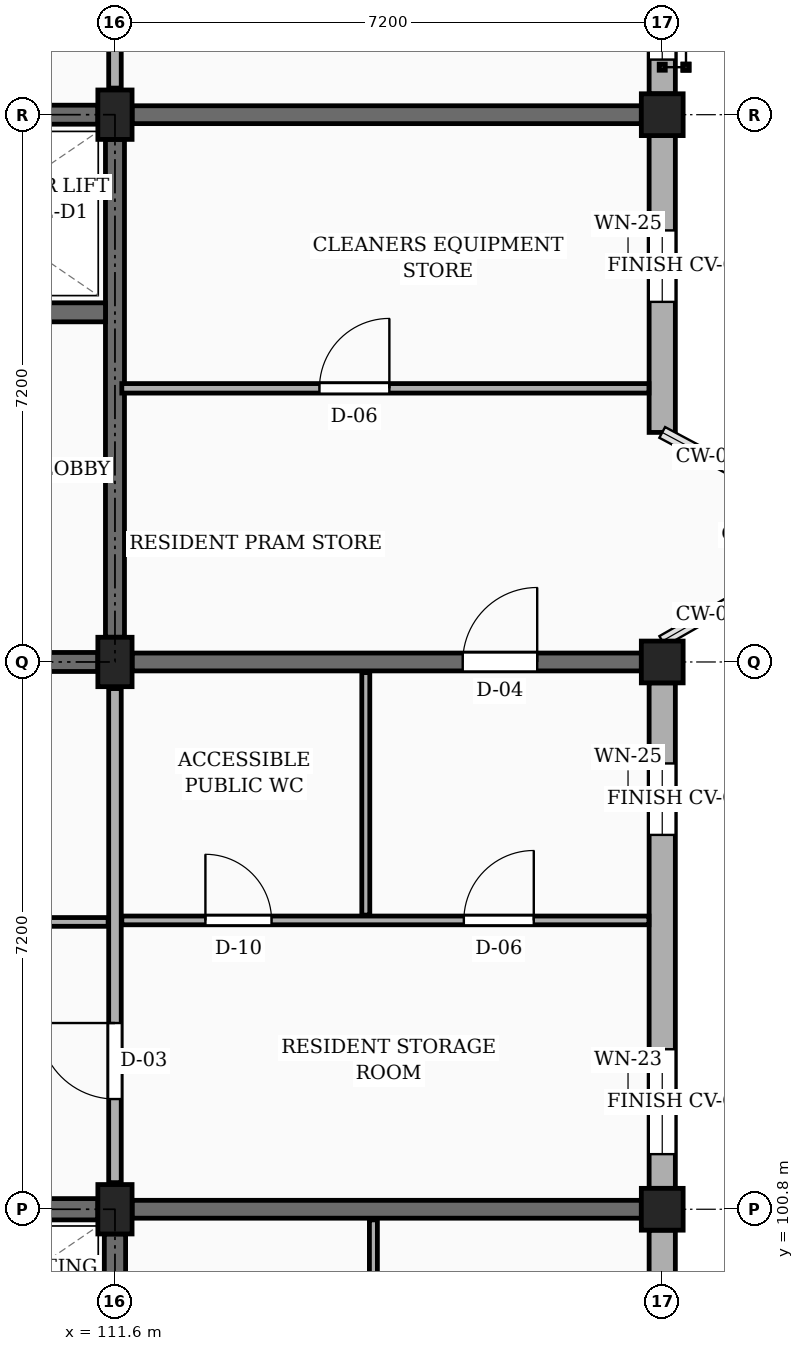
"""IFC4 building model, lengths in metres.
Left out: names, types, materials, properties, quantities, classifications, styles, units other than length and angle.
Written with IfcOpenShell. Run it as: python <this file> out.ifc"""

import sys

from ifc_helpers import new_model, si_unit, direction, frame, frame_2d, origin, origin_2d, place, context, subcontext, project, spatial, rectangle, extrude, element, fill, save


model = new_model("IFC4")
c1 = context("Model", 3, precision=1e-05, world=origin(), true_north=direction((0.0, 1.0)))
c2 = subcontext(c1, "Body", "Model", "MODEL_VIEW")
j1 = project(units=[si_unit("LENGTHUNIT", "METRE"), si_unit("PLANEANGLEUNIT", "RADIAN")], contexts=[c1])
p1 = place(None, origin())
s1 = spatial("IfcSite", under=j1, at=p1, CompositionType="ELEMENT")
p2 = place(p1, origin())
s2 = spatial("IfcBuilding", under=s1, at=p2, CompositionType="ELEMENT")
p3 = place(p2, frame((0.0, 0.0, 13.95)))
s3 = spatial("IfcBuildingStorey", under=s2, at=p3, CompositionType="ELEMENT", Elevation=13.95)
for number, where, z_axis, x_axis in (
    (1, (111.6, 100.8, 0.0), (0.0, 0.0, 1.0), (1.0, 0.0, 0.0)),
    (2, (111.6, 108.0, 0.0), (0.0, 0.0, 1.0), (1.0, 0.0, 0.0)),
    (3, (111.6, 115.2, 0.0), (0.0, 0.0, 1.0), (1.0, 0.0, 0.0)),
):
    element("IfcColumn", number, at=place(p3, frame(where, z_axis=z_axis, x_axis=x_axis)), inside=s3, PredefinedType="COLUMN", context=c2, shape_type="SweptSolid", body=[
        extrude(rectangle(XDim=0.45, YDim=0.65, at=origin_2d()), origin(), (0.0, 0.0, 1.0), 3.15),
    ])
for number, where, z_axis, x_axis in (
    (4, (118.8, 100.8, 0.0), (0.0, 0.0, 1.0), (1.0, 0.0, 0.0)),
    (5, (118.8, 108.0, 0.0), (0.0, 0.0, 1.0), (1.0, 0.0, 0.0)),
    (6, (118.8, 115.2, 0.0), (0.0, 0.0, 1.0), (1.0, 0.0, 0.0)),
):
    element("IfcColumn", number, at=place(p3, frame(where, z_axis=z_axis, x_axis=x_axis)), inside=s3, PredefinedType="COLUMN", context=c2, shape_type="SweptSolid", body=[
        extrude(rectangle(XDim=0.55, YDim=0.55, at=origin_2d()), origin(), (0.0, 0.0, 1.0), 3.15),
    ])
p4 = place(p3, frame((111.825, 100.8, 0.0), z_axis=(0.0, 0.0, 1.0), x_axis=(1.0, 0.0, 0.0)))
e7 = element("IfcWall", 7, at=p4, inside=s3, PredefinedType="SOLIDWALL", context=c2, shape_type="SweptSolid", body=[
    extrude(rectangle(XDim=6.7, YDim=0.235, at=frame_2d((3.35, 0.0))), origin(), (0.0, 0.0, 1.0), 2.19),
])
p5 = place(p3, frame((111.825, 108.0, 0.0), z_axis=(0.0, 0.0, 1.0), x_axis=(1.0, 0.0, 0.0)))
e8 = element("IfcWall", 8, at=p5, inside=s3, PredefinedType="SOLIDWALL", context=c2, shape_type="SweptSolid", body=[
    extrude(rectangle(XDim=6.7, YDim=0.235, at=frame_2d((3.35, 0.0))), origin(), (0.0, 0.0, 1.0), 2.19),
])
p6 = place(p5, frame((4.35, 0.0, 0.0)))
e9 = element("IfcOpeningElement", 9, at=p6, cuts=e8, PredefinedType="OPENING", context=c2, shape_type="SweptSolid", body=[
    extrude(rectangle(XDim=0.98, YDim=2.12, at=frame_2d((0.49, 1.06))), frame((0.0, 0.127, 0.0), z_axis=(0.0, -1.0, 0.0), x_axis=(1.0, 0.0, 0.0)), (0.0, 0.0, 1.0), 0.255),
])
p7 = place(p3, frame((111.825, 115.2, 0.0), z_axis=(0.0, 0.0, 1.0), x_axis=(1.0, 0.0, 0.0)))
e10 = element("IfcWall", 10, at=p7, inside=s3, PredefinedType="SOLIDWALL", context=c2, shape_type="SweptSolid", body=[
    extrude(rectangle(XDim=6.7, YDim=0.235, at=frame_2d((3.35, 0.0))), origin(), (0.0, 0.0, 1.0), 2.19),
])
p8 = place(p3, frame((118.8, 93.875, 0.0), z_axis=(0.0, 0.0, 1.0), x_axis=(0.0, 1.0, 0.0)))
e11 = element("IfcWall", 11, at=p8, inside=s3, PredefinedType="SOLIDWALL", context=c2, shape_type="SweptSolid", body=[
    extrude(rectangle(XDim=6.65, YDim=0.345, at=frame_2d((3.325, 0.0))), origin(), (0.0, 0.0, 1.0), 2.46),
])
p9 = place(p8, frame((0.45, 0.0, 0.78)))
e12 = element("IfcOpeningElement", 12, at=p9, cuts=e11, PredefinedType="OPENING", context=c2, shape_type="SweptSolid", body=[
    extrude(rectangle(XDim=1.22, YDim=1.36, at=frame_2d((0.61, 0.68))), frame((0.0, 0.183, 0.0), z_axis=(0.0, -1.0, 0.0), x_axis=(1.0, 0.0, 0.0)), (0.0, 0.0, 1.0), 0.365),
])
p10 = place(p8, frame((4.65, 0.0, 0.78)))
e13 = element("IfcOpeningElement", 13, at=p10, cuts=e11, PredefinedType="OPENING", context=c2, shape_type="SweptSolid", body=[
    extrude(rectangle(XDim=1.38, YDim=1.36, at=frame_2d((0.69, 0.68))), frame((0.0, 0.183, 0.0), z_axis=(0.0, -1.0, 0.0), x_axis=(1.0, 0.0, 0.0)), (0.0, 0.0, 1.0), 0.365),
])
p11 = place(p3, frame((118.8, 101.075, 0.0), z_axis=(0.0, 0.0, 1.0), x_axis=(0.0, 1.0, 0.0)))
e14 = element("IfcWall", 14, at=p11, inside=s3, PredefinedType="SOLIDWALL", context=c2, shape_type="SweptSolid", body=[
    extrude(rectangle(XDim=6.65, YDim=0.345, at=frame_2d((3.325, 0.0))), origin(), (0.0, 0.0, 1.0), 2.46),
])
p12 = place(p11, frame((0.45, 0.0, 0.78)))
e15 = element("IfcOpeningElement", 15, at=p12, cuts=e14, PredefinedType="OPENING", context=c2, shape_type="SweptSolid", body=[
    extrude(rectangle(XDim=1.38, YDim=1.36, at=frame_2d((0.69, 0.68))), frame((0.0, 0.183, 0.0), z_axis=(0.0, -1.0, 0.0), x_axis=(1.0, 0.0, 0.0)), (0.0, 0.0, 1.0), 0.365),
])
p13 = place(p11, frame((4.65, 0.0, 0.78)))
e16 = element("IfcOpeningElement", 16, at=p13, cuts=e14, PredefinedType="OPENING", context=c2, shape_type="SweptSolid", body=[
    extrude(rectangle(XDim=0.94, YDim=1.44, at=frame_2d((0.47, 0.72))), frame((0.0, 0.183, 0.0), z_axis=(0.0, -1.0, 0.0), x_axis=(1.0, 0.0, 0.0)), (0.0, 0.0, 1.0), 0.365),
])
p14 = place(p3, frame((118.8, 111.02, 0.0), z_axis=(0.0, 0.0, 1.0), x_axis=(0.0, 1.0, 0.0)))
e17 = element("IfcWall", 17, at=p14, inside=s3, PredefinedType="SOLIDWALL", context=c2, shape_type="SweptSolid", body=[
    extrude(rectangle(XDim=3.905, YDim=0.345, at=frame_2d((1.953, 0.0))), origin(), (0.0, 0.0, 1.0), 2.46),
])
p15 = place(p14, frame((1.718, 0.0, 0.78)))
e18 = element("IfcOpeningElement", 18, at=p15, cuts=e17, PredefinedType="OPENING", context=c2, shape_type="SweptSolid", body=[
    extrude(rectangle(XDim=0.94, YDim=1.44, at=frame_2d((0.47, 0.72))), frame((0.0, 0.183, 0.0), z_axis=(0.0, -1.0, 0.0), x_axis=(1.0, 0.0, 0.0)), (0.0, 0.0, 1.0), 0.365),
])
p16 = place(p3, frame((118.8, 115.475, 0.0), z_axis=(0.0, 0.0, 1.0), x_axis=(0.0, 1.0, 0.0)))
e19 = element("IfcWall", 19, at=p16, inside=s3, PredefinedType="SOLIDWALL", context=c2, shape_type="SweptSolid", body=[
    extrude(rectangle(XDim=6.65, YDim=0.345, at=frame_2d((3.325, 0.0))), origin(), (0.0, 0.0, 1.0), 2.46),
])
p17 = place(p16, frame((0.45, 0.0, 0.78)))
e20 = element("IfcOpeningElement", 20, at=p17, cuts=e19, PredefinedType="OPENING", context=c2, shape_type="SweptSolid", body=[
    extrude(rectangle(XDim=1.05, YDim=1.44, at=frame_2d((0.525, 0.72))), frame((0.0, 0.183, 0.0), z_axis=(0.0, -1.0, 0.0), x_axis=(1.0, 0.0, 0.0)), (0.0, 0.0, 1.0), 0.365),
])
p18 = place(p16, frame((4.65, 0.0, 0.78)))
e21 = element("IfcOpeningElement", 21, at=p18, cuts=e19, PredefinedType="OPENING", context=c2, shape_type="SweptSolid", body=[
    extrude(rectangle(XDim=1.25, YDim=1.44, at=frame_2d((0.625, 0.72))), frame((0.0, 0.183, 0.0), z_axis=(0.0, -1.0, 0.0), x_axis=(1.0, 0.0, 0.0)), (0.0, 0.0, 1.0), 0.365),
])
p19 = place(p3, frame((104.625, 100.8, 0.0), z_axis=(0.0, 0.0, 1.0), x_axis=(1.0, 0.0, 0.0)))
e22 = element("IfcWall", 22, at=p19, inside=s3, PredefinedType="SHEAR", context=c2, shape_type="SweptSolid", body=[
    extrude(rectangle(XDim=6.75, YDim=0.28, at=frame_2d((3.375, 0.0))), origin(), (0.0, 0.0, 1.0), 2.89),
])
p20 = place(p3, frame((111.6, 93.925, 0.0), z_axis=(0.0, 0.0, 1.0), x_axis=(0.0, 1.0, 0.0)))
e23 = element("IfcWall", 23, at=p20, inside=s3, PredefinedType="SHEAR", context=c2, shape_type="SweptSolid", body=[
    extrude(rectangle(XDim=6.55, YDim=0.28, at=frame_2d((3.275, 0.0))), origin(), (0.0, 0.0, 1.0), 2.89),
])
p21 = place(p3, frame((104.625, 115.2, 0.0), z_axis=(0.0, 0.0, 1.0), x_axis=(1.0, 0.0, 0.0)))
e24 = element("IfcWall", 24, at=p21, inside=s3, PredefinedType="SHEAR", context=c2, shape_type="SweptSolid", body=[
    extrude(rectangle(XDim=6.75, YDim=0.25, at=frame_2d((3.375, 0.0))), origin(), (0.0, 0.0, 1.0), 2.89),
])
p22 = place(p3, frame((111.6, 108.325, 0.0), z_axis=(0.0, 0.0, 1.0), x_axis=(0.0, 1.0, 0.0)))
e25 = element("IfcWall", 25, at=p22, inside=s3, PredefinedType="SHEAR", context=c2, shape_type="SweptSolid", body=[
    extrude(rectangle(XDim=6.55, YDim=0.25, at=frame_2d((3.275, 0.0))), origin(), (0.0, 0.0, 1.0), 2.89),
])
p23 = place(p3, frame((104.625, 108.0, 0.0), z_axis=(0.0, 0.0, 1.0), x_axis=(1.0, 0.0, 0.0)))
e26 = element("IfcWall", 26, at=p23, inside=s3, PredefinedType="SHEAR", context=c2, shape_type="SweptSolid", body=[
    extrude(rectangle(XDim=6.75, YDim=0.25, at=frame_2d((3.375, 0.0))), origin(), (0.0, 0.0, 1.0), 2.89),
])
p24 = place(p23, frame((4.525, 0.0, 0.0)))
e27 = element("IfcOpeningElement", 27, at=p24, cuts=e26, PredefinedType="OPENING", context=c2, shape_type="SweptSolid", body=[
    extrude(rectangle(XDim=1.1, YDim=2.15, at=frame_2d((0.55, 1.075))), frame((0.0, 0.135, 0.0), z_axis=(0.0, -1.0, 0.0), x_axis=(1.0, 0.0, 0.0)), (0.0, 0.0, 1.0), 0.27),
])
p25 = place(p3, frame((108.125, 112.6, 0.0), z_axis=(0.0, 0.0, 1.0), x_axis=(1.0, 0.0, 0.0)))
e28 = element("IfcWall", 28, at=p25, inside=s3, PredefinedType="SHEAR", context=c2, shape_type="SweptSolid", body=[
    extrude(rectangle(XDim=3.35, YDim=0.25, at=frame_2d((1.675, 0.0))), origin(), (0.0, 0.0, 1.0), 2.89),
])
p26 = place(p25, frame((1.1, 0.0, 0.0)))
e29 = element("IfcOpeningElement", 29, at=p26, cuts=e28, PredefinedType="OPENING", context=c2, shape_type="SweptSolid", body=[
    extrude(rectangle(XDim=1.0, YDim=2.2, at=frame_2d((0.5, 1.1))), frame((0.0, 0.135, 0.0), z_axis=(0.0, -1.0, 0.0), x_axis=(1.0, 0.0, 0.0)), (0.0, 0.0, 1.0), 0.27),
])
p27 = place(p3, frame((111.6, 101.15, 0.0), z_axis=(0.0, 0.0, 1.0), x_axis=(0.0, 1.0, 0.0)))
e30 = element("IfcWall", 30, at=p27, inside=s3, PredefinedType="PARTITIONING", context=c2, shape_type="SweptSolid", body=[
    extrude(rectangle(XDim=6.5, YDim=0.165, at=frame_2d((3.25, 0.0))), origin(), (0.0, 0.0, 1.0), 2.325),
])
p28 = place(p27, frame((1.1, 0.0, 0.0)))
e31 = element("IfcOpeningElement", 31, at=p28, cuts=e30, PredefinedType="OPENING", context=c2, shape_type="SweptSolid", body=[
    extrude(rectangle(XDim=1.0, YDim=2.15, at=frame_2d((0.5, 1.075))), frame((0.0, 0.093, 0.0), z_axis=(0.0, -1.0, 0.0), x_axis=(1.0, 0.0, 0.0)), (0.0, 0.0, 1.0), 0.185),
])
p29 = place(p3, frame((111.6, 115.55, 0.0), z_axis=(0.0, 0.0, 1.0), x_axis=(0.0, 1.0, 0.0)))
e32 = element("IfcWall", 32, at=p29, inside=s3, PredefinedType="PARTITIONING", context=c2, shape_type="SweptSolid", body=[
    extrude(rectangle(XDim=6.5, YDim=0.165, at=frame_2d((3.25, 0.0))), origin(), (0.0, 0.0, 1.0), 2.325),
])
p30 = place(p29, frame((1.1, 0.0, 0.0)))
e33 = element("IfcOpeningElement", 33, at=p30, cuts=e32, PredefinedType="OPENING", context=c2, shape_type="SweptSolid", body=[
    extrude(rectangle(XDim=0.94, YDim=2.12, at=frame_2d((0.47, 1.06))), frame((0.0, 0.093, 0.0), z_axis=(0.0, -1.0, 0.0), x_axis=(1.0, 0.0, 0.0)), (0.0, 0.0, 1.0), 0.185),
])
p31 = place(p3, frame((115.0, 96.97, 0.0), z_axis=(0.0, 0.0, 1.0), x_axis=(0.0, 1.0, 0.0)))
e34 = element("IfcWall", 34, at=p31, inside=s3, PredefinedType="PARTITIONING", context=c2, shape_type="SweptSolid", body=[
    extrude(rectangle(XDim=3.69, YDim=0.105, at=frame_2d((1.845, 0.0))), origin(), (0.0, 0.0, 1.0), 2.325),
])
p32 = place(p3, frame((104.49, 104.58, 0.0), z_axis=(0.0, 0.0, 1.0), x_axis=(1.0, 0.0, 0.0)))
e35 = element("IfcWall", 35, at=p32, inside=s3, PredefinedType="PARTITIONING", context=c2, shape_type="SweptSolid", body=[
    extrude(rectangle(XDim=7.02, YDim=0.115, at=frame_2d((3.51, 0.0))), origin(), (0.0, 0.0, 1.0), 2.325),
])
p33 = place(p32, frame((2.85, 0.0, 0.0)))
e36 = element("IfcOpeningElement", 36, at=p33, cuts=e35, PredefinedType="OPENING", context=c2, shape_type="SweptSolid", body=[
    extrude(rectangle(XDim=1.02, YDim=2.15, at=frame_2d((0.51, 1.075))), frame((0.0, 0.067, 0.0), z_axis=(0.0, -1.0, 0.0), x_axis=(1.0, 0.0, 0.0)), (0.0, 0.0, 1.0), 0.135),
])
p34 = place(p3, frame((111.69, 104.6, 0.0), z_axis=(0.0, 0.0, 1.0), x_axis=(1.0, 0.0, 0.0)))
e37 = element("IfcWall", 37, at=p34, inside=s3, PredefinedType="PARTITIONING", context=c2, shape_type="SweptSolid", body=[
    extrude(rectangle(XDim=6.935, YDim=0.115, at=frame_2d((3.468, 0.0))), origin(), (0.0, 0.0, 1.0), 2.325),
])
p35 = place(p34, frame((1.1, 0.0, 0.0)))
e38 = element("IfcOpeningElement", 38, at=p35, cuts=e37, PredefinedType="OPENING", context=c2, shape_type="SweptSolid", body=[
    extrude(rectangle(XDim=0.87, YDim=2.05, at=frame_2d((0.435, 1.025))), frame((0.0, 0.067, 0.0), z_axis=(0.0, -1.0, 0.0), x_axis=(1.0, 0.0, 0.0)), (0.0, 0.0, 1.0), 0.135),
])
p36 = place(p34, frame((4.5, 0.0, 0.0)))
e39 = element("IfcOpeningElement", 39, at=p36, cuts=e37, PredefinedType="OPENING", context=c2, shape_type="SweptSolid", body=[
    extrude(rectangle(XDim=0.92, YDim=2.1, at=frame_2d((0.46, 1.05))), frame((0.0, 0.067, 0.0), z_axis=(0.0, -1.0, 0.0), x_axis=(1.0, 0.0, 0.0)), (0.0, 0.0, 1.0), 0.135),
])
p37 = place(p3, frame((114.9, 104.67, 0.0), z_axis=(0.0, 0.0, 1.0), x_axis=(0.0, 1.0, 0.0)))
e40 = element("IfcWall", 40, at=p37, inside=s3, PredefinedType="PARTITIONING", context=c2, shape_type="SweptSolid", body=[
    extrude(rectangle(XDim=3.19, YDim=0.105, at=frame_2d((1.595, 0.0))), origin(), (0.0, 0.0, 1.0), 2.325),
])
p38 = place(p3, frame((111.69, 111.6, 0.0), z_axis=(0.0, 0.0, 1.0), x_axis=(1.0, 0.0, 0.0)))
e41 = element("IfcWall", 41, at=p38, inside=s3, PredefinedType="PARTITIONING", context=c2, shape_type="SweptSolid", body=[
    extrude(rectangle(XDim=6.935, YDim=0.125, at=frame_2d((3.468, 0.0))), origin(), (0.0, 0.0, 1.0), 2.325),
])
p39 = place(p38, frame((2.6, 0.0, 0.0)))
e42 = element("IfcOpeningElement", 42, at=p39, cuts=e41, PredefinedType="OPENING", context=c2, shape_type="SweptSolid", body=[
    extrude(rectangle(XDim=0.92, YDim=2.1, at=frame_2d((0.46, 1.05))), frame((0.0, 0.073, 0.0), z_axis=(0.0, -1.0, 0.0), x_axis=(1.0, 0.0, 0.0)), (0.0, 0.0, 1.0), 0.145),
])
p40 = place(p12, origin())
e43 = element("IfcWindow", 43, at=p40, inside=s3, PartitioningType="SINGLE_PANEL", PredefinedType="WINDOW", context=c2, shape_type="SweptSolid", body=[
    extrude(rectangle(XDim=1.38, YDim=1.36, at=frame_2d((0.69, 0.68))), frame((0.0, 0.03, 0.0), z_axis=(0.0, -1.0, 0.0), x_axis=(1.0, 0.0, 0.0)), (0.0, 0.0, 1.0), 0.06),
])
fill(e15, e43)
p41 = place(p13, origin())
e44 = element("IfcWindow", 44, at=p41, inside=s3, PartitioningType="SINGLE_PANEL", PredefinedType="WINDOW", context=c2, shape_type="SweptSolid", body=[
    extrude(rectangle(XDim=0.94, YDim=1.44, at=frame_2d((0.47, 0.72))), frame((0.0, 0.03, 0.0), z_axis=(0.0, -1.0, 0.0), x_axis=(1.0, 0.0, 0.0)), (0.0, 0.0, 1.0), 0.06),
])
fill(e16, e44)
p42 = place(p15, origin())
e45 = element("IfcWindow", 45, at=p42, inside=s3, PartitioningType="SINGLE_PANEL", PredefinedType="WINDOW", context=c2, shape_type="SweptSolid", body=[
    extrude(rectangle(XDim=0.94, YDim=1.44, at=frame_2d((0.47, 0.72))), frame((0.0, 0.03, 0.0), z_axis=(0.0, -1.0, 0.0), x_axis=(1.0, 0.0, 0.0)), (0.0, 0.0, 1.0), 0.06),
])
fill(e18, e45)
p43 = place(p17, origin())
e46 = element("IfcWindow", 46, at=p43, inside=s3, PartitioningType="SINGLE_PANEL", PredefinedType="WINDOW", context=c2, shape_type="SweptSolid", body=[
    extrude(rectangle(XDim=1.05, YDim=1.44, at=frame_2d((0.525, 0.72))), frame((0.0, 0.03, 0.0), z_axis=(0.0, -1.0, 0.0), x_axis=(1.0, 0.0, 0.0)), (0.0, 0.0, 1.0), 0.06),
])
fill(e20, e46)
p44 = place(p28, origin())
e47 = element("IfcDoor", 47, at=p44, inside=s3, OperationType="SINGLE_SWING_RIGHT", PredefinedType="DOOR", context=c2, shape_type="SweptSolid", body=[
    extrude(rectangle(XDim=1.0, YDim=2.15, at=frame_2d((0.5, 1.075))), frame((0.0, 0.025, 0.0), z_axis=(0.0, -1.0, 0.0), x_axis=(1.0, 0.0, 0.0)), (0.0, 0.0, 1.0), 0.05),
])
fill(e31, e47)
p45 = place(p35, origin())
e48 = element("IfcDoor", 48, at=p45, inside=s3, OperationType="SINGLE_SWING_LEFT", PredefinedType="DOOR", context=c2, shape_type="SweptSolid", body=[
    extrude(rectangle(XDim=0.87, YDim=2.05, at=frame_2d((0.435, 1.025))), frame((0.0, 0.025, 0.0), z_axis=(0.0, -1.0, 0.0), x_axis=(1.0, 0.0, 0.0)), (0.0, 0.0, 1.0), 0.05),
])
fill(e38, e48)
p46 = place(p36, origin())
e49 = element("IfcDoor", 49, at=p46, inside=s3, OperationType="SINGLE_SWING_RIGHT", PredefinedType="DOOR", context=c2, shape_type="SweptSolid", body=[
    extrude(rectangle(XDim=0.92, YDim=2.1, at=frame_2d((0.46, 1.05))), frame((0.0, 0.025, 0.0), z_axis=(0.0, -1.0, 0.0), x_axis=(1.0, 0.0, 0.0)), (0.0, 0.0, 1.0), 0.05),
])
fill(e39, e49)
p47 = place(p39, origin())
e50 = element("IfcDoor", 50, at=p47, inside=s3, OperationType="SINGLE_SWING_RIGHT", PredefinedType="DOOR", context=c2, shape_type="SweptSolid", body=[
    extrude(rectangle(XDim=0.92, YDim=2.1, at=frame_2d((0.46, 1.05))), frame((0.0, 0.025, 0.0), z_axis=(0.0, -1.0, 0.0), x_axis=(1.0, 0.0, 0.0)), (0.0, 0.0, 1.0), 0.05),
])
fill(e42, e50)
p48 = place(p6, origin())
e51 = element("IfcDoor", 51, at=p48, inside=s3, OperationType="SINGLE_SWING_RIGHT", PredefinedType="DOOR", context=c2, shape_type="SweptSolid", body=[
    extrude(rectangle(XDim=0.98, YDim=2.12, at=frame_2d((0.49, 1.06))), frame((0.0, 0.025, 0.0), z_axis=(0.0, -1.0, 0.0), x_axis=(1.0, 0.0, 0.0)), (0.0, 0.0, 1.0), 0.05),
])
fill(e9, e51)
save(model, sys.argv[1])
